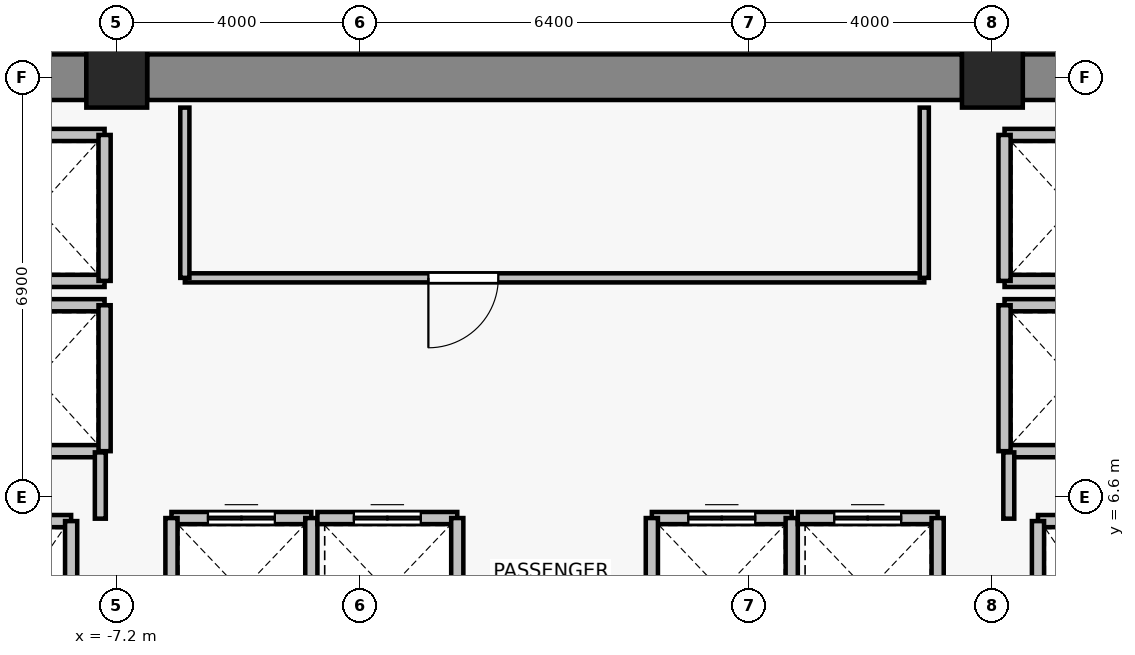
"""IFC4 building model, lengths in metres.
Left out: names, types, materials, properties, quantities, classifications, styles, units other than length and angle.
Written with IfcOpenShell. Run it as: python <this file> out.ifc"""

import sys

from ifc_helpers import new_model, si_unit, direction, frame, frame_2d, origin, origin_2d, place, context, subcontext, project, spatial, rectangle, extrude, source, transform, mapped, element, fill, save


model = new_model("IFC4")
c1 = context("Model", 3, precision=1e-05, world=origin(), true_north=direction((0.0, 1.0)))
c2 = subcontext(c1, "Body", "Model", "MODEL_VIEW")
j1 = project(units=[si_unit("LENGTHUNIT", "METRE"), si_unit("PLANEANGLEUNIT", "RADIAN")], contexts=[c1])
p1 = place(None, origin())
s1 = spatial("IfcSite", under=j1, at=p1, CompositionType="ELEMENT")
p2 = place(p1, origin())
s2 = spatial("IfcBuilding", under=s1, at=p2, CompositionType="ELEMENT")
p3 = place(p2, frame((0.0, 0.0, 169.3)))
s3 = spatial("IfcBuildingStorey", under=s2, at=p3, CompositionType="ELEMENT", Elevation=169.3)
for number, where, z_axis, x_axis in (
    (1, (-7.2, 13.5, 0.0), (0.0, 0.0, 1.0), (1.0, 0.0, 0.0)),
    (2, (7.2, 13.5, 0.0), (0.0, 0.0, 1.0), (1.0, 0.0, 0.0)),
):
    element("IfcColumn", number, at=place(p3, frame(where, z_axis=z_axis, x_axis=x_axis)), inside=s3, PredefinedType="COLUMN", context=c2, shape_type="SweptSolid", body=[
        extrude(rectangle(XDim=1.0, YDim=1.0, at=origin_2d()), origin(), (0.0, 0.0, 1.0), 3.3),
    ])
p4 = place(p3, frame((-13.9, 13.5, 0.0), z_axis=(0.0, 0.0, 1.0), x_axis=(1.0, 0.0, 0.0)))
e3 = element("IfcWall", 3, at=p4, inside=s3, PredefinedType="SHEAR", context=c2, shape_type="SweptSolid", body=[
    extrude(rectangle(XDim=6.2, YDim=0.75, at=frame_2d((3.1, 0.0))), origin(), (0.0, 0.0, 1.0), 3.075),
])
p5 = place(p3, frame((-6.7, 13.5, 0.0), z_axis=(0.0, 0.0, 1.0), x_axis=(1.0, 0.0, 0.0)))
e4 = element("IfcWall", 4, at=p5, inside=s3, PredefinedType="SHEAR", context=c2, shape_type="SweptSolid", body=[
    extrude(rectangle(XDim=13.4, YDim=0.75, at=frame_2d((6.7, 0.0))), origin(), (0.0, 0.0, 1.0), 3.075),
])
p6 = place(p3, frame((7.7, 13.5, 0.0), z_axis=(0.0, 0.0, 1.0), x_axis=(1.0, 0.0, 0.0)))
e5 = element("IfcWall", 5, at=p6, inside=s3, PredefinedType="SHEAR", context=c2, shape_type="SweptSolid", body=[
    extrude(rectangle(XDim=6.2, YDim=0.75, at=frame_2d((3.1, 0.0))), origin(), (0.0, 0.0, 1.0), 3.075),
])
p7 = place(p3, frame((-9.95, 6.2, 0.0), z_axis=(0.0, 0.0, 1.0), x_axis=(1.0, 0.0, 0.0)))
e6 = element("IfcWall", 6, at=p7, inside=s3, PredefinedType="SOLIDWALL", context=c2, shape_type="SweptSolid", body=[
    extrude(rectangle(XDim=2.0, YDim=0.2, at=frame_2d((1.0, 0.0))), origin(), (0.0, 0.0, 1.0), 3.075),
])
p8 = place(p3, frame((-7.95, 6.2, 0.0), z_axis=(0.0, 0.0, 1.0), x_axis=(0.0, -1.0, 0.0)))
e7 = element("IfcWall", 7, at=p8, inside=s3, PredefinedType="SOLIDWALL", context=c2, shape_type="SweptSolid", body=[
    extrude(rectangle(XDim=2.8, YDim=0.2, at=frame_2d((1.4, 0.0))), origin(), (0.0, 0.0, 1.0), 3.075),
])
p9 = place(p3, frame((7.95, 6.2, 0.0), z_axis=(0.0, 0.0, 1.0), x_axis=(1.0, 0.0, 0.0)))
e8 = element("IfcWall", 8, at=p9, inside=s3, PredefinedType="SOLIDWALL", context=c2, shape_type="SweptSolid", body=[
    extrude(rectangle(XDim=2.0, YDim=0.2, at=frame_2d((1.0, 0.0))), origin(), (0.0, 0.0, 1.0), 3.075),
])
p10 = place(p3, frame((7.95, 3.4, 0.0), z_axis=(0.0, 0.0, 1.0), x_axis=(0.0, 1.0, 0.0)))
e9 = element("IfcWall", 9, at=p10, inside=s3, PredefinedType="SOLIDWALL", context=c2, shape_type="SweptSolid", body=[
    extrude(rectangle(XDim=2.8, YDim=0.2, at=frame_2d((1.4, 0.0))), origin(), (0.0, 0.0, 1.0), 3.075),
])
p11 = place(p3, frame((-6.3, 6.25, 0.0), z_axis=(0.0, 0.0, 1.0), x_axis=(1.0, 0.0, 0.0)))
e10 = element("IfcWall", 10, at=p11, inside=s3, PredefinedType="SOLIDWALL", context=c2, shape_type="SweptSolid", body=[
    extrude(rectangle(XDim=2.3, YDim=0.2, at=frame_2d((1.15, 0.0))), origin(), (0.0, 0.0, 1.0), 3.075),
])
p12 = place(p11, frame((0.6, 0.0, 0.0)))
e11 = element("IfcOpeningElement", 11, at=p12, cuts=e10, PredefinedType="OPENING", context=c2, shape_type="SweptSolid", body=[
    extrude(rectangle(XDim=1.1, YDim=2.2, at=frame_2d((0.55, 1.1))), frame((0.0, 0.11, 0.0), z_axis=(0.0, -1.0, 0.0), x_axis=(1.0, 0.0, 0.0)), (0.0, 0.0, 1.0), 0.22),
])
for number, where, z_axis, x_axis in (
    (12, (-6.3, 3.85, 0.0), (0.0, 0.0, 1.0), (0.0, 1.0, 0.0)),
    (13, (-4.0, 6.25, 0.0), (0.0, 0.0, 1.0), (0.0, -1.0, 0.0)),
):
    element("IfcWall", number, at=place(p3, frame(where, z_axis=z_axis, x_axis=x_axis)), inside=s3, PredefinedType="SOLIDWALL", context=c2, shape_type="SweptSolid", body=[
        extrude(rectangle(XDim=2.4, YDim=0.2, at=frame_2d((1.2, 0.0))), origin(), (0.0, 0.0, 1.0), 3.075),
    ])
p13 = place(p3, frame((-3.9, 6.25, 0.0), z_axis=(0.0, 0.0, 1.0), x_axis=(1.0, 0.0, 0.0)))
e14 = element("IfcWall", 14, at=p13, inside=s3, PredefinedType="SOLIDWALL", context=c2, shape_type="SweptSolid", body=[
    extrude(rectangle(XDim=2.3, YDim=0.2, at=frame_2d((1.15, 0.0))), origin(), (0.0, 0.0, 1.0), 3.075),
])
p14 = place(p13, frame((0.6, 0.0, 0.0)))
e15 = element("IfcOpeningElement", 15, at=p14, cuts=e14, PredefinedType="OPENING", context=c2, shape_type="SweptSolid", body=[
    extrude(rectangle(XDim=1.1, YDim=2.2, at=frame_2d((0.55, 1.1))), frame((0.0, 0.11, 0.0), z_axis=(0.0, -1.0, 0.0), x_axis=(1.0, 0.0, 0.0)), (0.0, 0.0, 1.0), 0.22),
])
p15 = place(p3, frame((-1.6, 6.25, 0.0), z_axis=(0.0, 0.0, 1.0), x_axis=(0.0, -1.0, 0.0)))
e16 = element("IfcWall", 16, at=p15, inside=s3, PredefinedType="SOLIDWALL", context=c2, shape_type="SweptSolid", body=[
    extrude(rectangle(XDim=2.4, YDim=0.2, at=frame_2d((1.2, 0.0))), origin(), (0.0, 0.0, 1.0), 3.075),
])
p16 = place(p3, frame((1.6, 6.25, 0.0), z_axis=(0.0, 0.0, 1.0), x_axis=(1.0, 0.0, 0.0)))
e17 = element("IfcWall", 17, at=p16, inside=s3, PredefinedType="SOLIDWALL", context=c2, shape_type="SweptSolid", body=[
    extrude(rectangle(XDim=2.3, YDim=0.2, at=frame_2d((1.15, 0.0))), origin(), (0.0, 0.0, 1.0), 3.075),
])
p17 = place(p16, frame((0.6, 0.0, 0.0)))
e18 = element("IfcOpeningElement", 18, at=p17, cuts=e17, PredefinedType="OPENING", context=c2, shape_type="SweptSolid", body=[
    extrude(rectangle(XDim=1.1, YDim=2.2, at=frame_2d((0.55, 1.1))), frame((0.0, 0.11, 0.0), z_axis=(0.0, -1.0, 0.0), x_axis=(1.0, 0.0, 0.0)), (0.0, 0.0, 1.0), 0.22),
])
for number, where, z_axis, x_axis in (
    (19, (1.6, 3.85, 0.0), (0.0, 0.0, 1.0), (0.0, 1.0, 0.0)),
    (20, (3.9, 6.25, 0.0), (0.0, 0.0, 1.0), (0.0, -1.0, 0.0)),
):
    element("IfcWall", number, at=place(p3, frame(where, z_axis=z_axis, x_axis=x_axis)), inside=s3, PredefinedType="SOLIDWALL", context=c2, shape_type="SweptSolid", body=[
        extrude(rectangle(XDim=2.4, YDim=0.2, at=frame_2d((1.2, 0.0))), origin(), (0.0, 0.0, 1.0), 3.075),
    ])
p18 = place(p3, frame((4.0, 6.25, 0.0), z_axis=(0.0, 0.0, 1.0), x_axis=(1.0, 0.0, 0.0)))
e21 = element("IfcWall", 21, at=p18, inside=s3, PredefinedType="SOLIDWALL", context=c2, shape_type="SweptSolid", body=[
    extrude(rectangle(XDim=2.3, YDim=0.2, at=frame_2d((1.15, 0.0))), origin(), (0.0, 0.0, 1.0), 3.075),
])
p19 = place(p18, frame((0.6, 0.0, 0.0)))
e22 = element("IfcOpeningElement", 22, at=p19, cuts=e21, PredefinedType="OPENING", context=c2, shape_type="SweptSolid", body=[
    extrude(rectangle(XDim=1.1, YDim=2.2, at=frame_2d((0.55, 1.1))), frame((0.0, 0.11, 0.0), z_axis=(0.0, -1.0, 0.0), x_axis=(1.0, 0.0, 0.0)), (0.0, 0.0, 1.0), 0.22),
])
p20 = place(p3, frame((6.3, 6.25, 0.0), z_axis=(0.0, 0.0, 1.0), x_axis=(0.0, -1.0, 0.0)))
e23 = element("IfcWall", 23, at=p20, inside=s3, PredefinedType="SOLIDWALL", context=c2, shape_type="SweptSolid", body=[
    extrude(rectangle(XDim=2.4, YDim=0.2, at=frame_2d((1.2, 0.0))), origin(), (0.0, 0.0, 1.0), 3.075),
])
for number, where, z_axis, x_axis in (
    (24, (-7.4, 7.35, 0.0), (0.0, 0.0, 1.0), (-1.0, 0.0, 0.0)),
    (25, (-9.6, 9.75, 0.0), (0.0, 0.0, 1.0), (1.0, 0.0, 0.0)),
):
    element("IfcWall", number, at=place(p3, frame(where, z_axis=z_axis, x_axis=x_axis)), inside=s3, PredefinedType="SOLIDWALL", context=c2, shape_type="SweptSolid", body=[
        extrude(rectangle(XDim=2.2, YDim=0.2, at=frame_2d((1.1, 0.0))), origin(), (0.0, 0.0, 1.0), 2.565),
    ])
p21 = place(p3, frame((-7.4, 9.75, 0.0), z_axis=(0.0, 0.0, 1.0), x_axis=(0.0, -1.0, 0.0)))
e26 = element("IfcWall", 26, at=p21, inside=s3, PredefinedType="SOLIDWALL", context=c2, shape_type="SweptSolid", body=[
    extrude(rectangle(XDim=2.4, YDim=0.2, at=frame_2d((1.2, 0.0))), origin(), (0.0, 0.0, 1.0), 2.565),
])
for number, where, z_axis, x_axis in (
    (27, (-7.4, 10.15, 0.0), (0.0, 0.0, 1.0), (-1.0, 0.0, 0.0)),
    (28, (-9.6, 12.55, 0.0), (0.0, 0.0, 1.0), (1.0, 0.0, 0.0)),
):
    element("IfcWall", number, at=place(p3, frame(where, z_axis=z_axis, x_axis=x_axis)), inside=s3, PredefinedType="SOLIDWALL", context=c2, shape_type="SweptSolid", body=[
        extrude(rectangle(XDim=2.2, YDim=0.2, at=frame_2d((1.1, 0.0))), origin(), (0.0, 0.0, 1.0), 2.565),
    ])
p22 = place(p3, frame((-7.4, 12.55, 0.0), z_axis=(0.0, 0.0, 1.0), x_axis=(0.0, -1.0, 0.0)))
e29 = element("IfcWall", 29, at=p22, inside=s3, PredefinedType="SOLIDWALL", context=c2, shape_type="SweptSolid", body=[
    extrude(rectangle(XDim=2.4, YDim=0.2, at=frame_2d((1.2, 0.0))), origin(), (0.0, 0.0, 1.0), 2.565),
])
for number, where, z_axis, x_axis in (
    (30, (9.6, 7.35, 0.0), (0.0, 0.0, 1.0), (-1.0, 0.0, 0.0)),
    (31, (7.4, 9.75, 0.0), (0.0, 0.0, 1.0), (1.0, 0.0, 0.0)),
):
    element("IfcWall", number, at=place(p3, frame(where, z_axis=z_axis, x_axis=x_axis)), inside=s3, PredefinedType="SOLIDWALL", context=c2, shape_type="SweptSolid", body=[
        extrude(rectangle(XDim=2.2, YDim=0.2, at=frame_2d((1.1, 0.0))), origin(), (0.0, 0.0, 1.0), 2.565),
    ])
p23 = place(p3, frame((7.4, 7.35, 0.0), z_axis=(0.0, 0.0, 1.0), x_axis=(0.0, 1.0, 0.0)))
e32 = element("IfcWall", 32, at=p23, inside=s3, PredefinedType="SOLIDWALL", context=c2, shape_type="SweptSolid", body=[
    extrude(rectangle(XDim=2.4, YDim=0.2, at=frame_2d((1.2, 0.0))), origin(), (0.0, 0.0, 1.0), 2.565),
])
for number, where, z_axis, x_axis in (
    (33, (9.6, 10.15, 0.0), (0.0, 0.0, 1.0), (-1.0, 0.0, 0.0)),
    (34, (7.4, 12.55, 0.0), (0.0, 0.0, 1.0), (1.0, 0.0, 0.0)),
):
    element("IfcWall", number, at=place(p3, frame(where, z_axis=z_axis, x_axis=x_axis)), inside=s3, PredefinedType="SOLIDWALL", context=c2, shape_type="SweptSolid", body=[
        extrude(rectangle(XDim=2.2, YDim=0.2, at=frame_2d((1.1, 0.0))), origin(), (0.0, 0.0, 1.0), 2.565),
    ])
p24 = place(p3, frame((7.4, 10.15, 0.0), z_axis=(0.0, 0.0, 1.0), x_axis=(0.0, 1.0, 0.0)))
e35 = element("IfcWall", 35, at=p24, inside=s3, PredefinedType="SOLIDWALL", context=c2, shape_type="SweptSolid", body=[
    extrude(rectangle(XDim=2.4, YDim=0.2, at=frame_2d((1.2, 0.0))), origin(), (0.0, 0.0, 1.0), 2.565),
])
for number, where, z_axis, x_axis in (
    (36, (-7.47, 7.33, 0.0), (0.0, 0.0, 1.0), (0.0, -1.0, 0.0)),
    (37, (7.47, 6.24, 0.0), (0.0, 0.0, 1.0), (0.0, 1.0, 0.0)),
):
    element("IfcWall", number, at=place(p3, frame(where, z_axis=z_axis, x_axis=x_axis)), inside=s3, PredefinedType="PARTITIONING", context=c2, shape_type="SweptSolid", body=[
        extrude(rectangle(XDim=1.09, YDim=0.18, at=frame_2d((0.545, 0.0))), origin(), (0.0, 0.0, 1.0), 2.565),
    ])
p25 = place(p3, frame((6.08, 10.2, 0.0), z_axis=(0.0, 0.0, 1.0), x_axis=(-1.0, 0.0, 0.0)))
e38 = element("IfcWall", 38, at=p25, inside=s3, PredefinedType="PARTITIONING", context=c2, shape_type="SweptSolid", body=[
    extrude(rectangle(XDim=12.16, YDim=0.15, at=frame_2d((6.08, 0.0))), origin(), (0.0, 0.0, 1.0), 3.075),
])
p26 = place(p25, frame((7.005, 0.0, 0.0)))
e39 = element("IfcOpeningElement", 39, at=p26, cuts=e38, PredefinedType="OPENING", context=c2, shape_type="SweptSolid", body=[
    extrude(rectangle(XDim=1.15, YDim=2.15, at=frame_2d((0.575, 1.075))), frame((0.0, 0.085, 0.0), z_axis=(0.0, -1.0, 0.0), x_axis=(1.0, 0.0, 0.0)), (0.0, 0.0, 1.0), 0.17),
])
for number, where, z_axis, x_axis in (
    (40, (-6.08, 10.2, 0.0), (0.0, 0.0, 1.0), (0.0, 1.0, 0.0)),
    (41, (6.08, 13.0, 0.0), (0.0, 0.0, 1.0), (0.0, -1.0, 0.0)),
):
    element("IfcWall", number, at=place(p3, frame(where, z_axis=z_axis, x_axis=x_axis)), inside=s3, PredefinedType="PARTITIONING", context=c2, shape_type="SweptSolid", body=[
        extrude(rectangle(XDim=2.8, YDim=0.15, at=frame_2d((1.4, 0.0))), origin(), (0.0, 0.0, 1.0), 3.075),
    ])
m1 = source(origin(), c2, "Body", "SweptSolid", [
    extrude(rectangle(XDim=1.1, YDim=2.2, at=frame_2d((0.55, 1.1))), frame((0.0, 0.025, 0.0), z_axis=(0.0, -1.0, 0.0), x_axis=(1.0, 0.0, 0.0)), (0.0, 0.0, 1.0), 0.05),
])
p27 = place(p12, origin())
e42 = element("IfcDoor", 42, at=p27, inside=s3, OperationType="DOUBLE_DOOR_SLIDING", PredefinedType="DOOR", context=c2, shape_type="MappedRepresentation", body=[
    mapped(m1, transform((0.0, 0.0, 0.0), x_axis=(1.0, 0.0, 0.0), y_axis=(0.0, 1.0, 0.0), z_axis=(0.0, 0.0, 1.0), scale=1.0)),
])
fill(e11, e42)
p28 = place(p14, origin())
e43 = element("IfcDoor", 43, at=p28, inside=s3, OperationType="DOUBLE_DOOR_SLIDING", PredefinedType="DOOR", context=c2, shape_type="MappedRepresentation", body=[
    mapped(m1, transform((0.0, 0.0, 0.0), x_axis=(1.0, 0.0, 0.0), y_axis=(0.0, 1.0, 0.0), z_axis=(0.0, 0.0, 1.0), scale=1.0)),
])
fill(e15, e43)
p29 = place(p17, origin())
e44 = element("IfcDoor", 44, at=p29, inside=s3, OperationType="DOUBLE_DOOR_SLIDING", PredefinedType="DOOR", context=c2, shape_type="MappedRepresentation", body=[
    mapped(m1, transform((0.0, 0.0, 0.0), x_axis=(1.0, 0.0, 0.0), y_axis=(0.0, 1.0, 0.0), z_axis=(0.0, 0.0, 1.0), scale=1.0)),
])
fill(e18, e44)
p30 = place(p19, origin())
e45 = element("IfcDoor", 45, at=p30, inside=s3, OperationType="DOUBLE_DOOR_SLIDING", PredefinedType="DOOR", context=c2, shape_type="MappedRepresentation", body=[
    mapped(m1, transform((0.0, 0.0, 0.0), x_axis=(1.0, 0.0, 0.0), y_axis=(0.0, 1.0, 0.0), z_axis=(0.0, 0.0, 1.0), scale=1.0)),
])
fill(e22, e45)
m2 = source(origin(), c2, "Body", "SweptSolid", [
    extrude(rectangle(XDim=1.15, YDim=2.15, at=frame_2d((0.575, 1.075))), frame((0.0, 0.025, 0.0), z_axis=(0.0, -1.0, 0.0), x_axis=(1.0, 0.0, 0.0)), (0.0, 0.0, 1.0), 0.05),
])
p31 = place(p26, origin())
e46 = element("IfcDoor", 46, at=p31, inside=s3, OperationType="SINGLE_SWING_RIGHT", PredefinedType="DOOR", context=c2, shape_type="MappedRepresentation", body=[
    mapped(m2, transform((0.0, 0.0, 0.0), x_axis=(1.0, 0.0, 0.0), y_axis=(0.0, 1.0, 0.0), z_axis=(0.0, 0.0, 1.0), scale=1.0)),
])
fill(e39, e46)
save(model, sys.argv[1])
